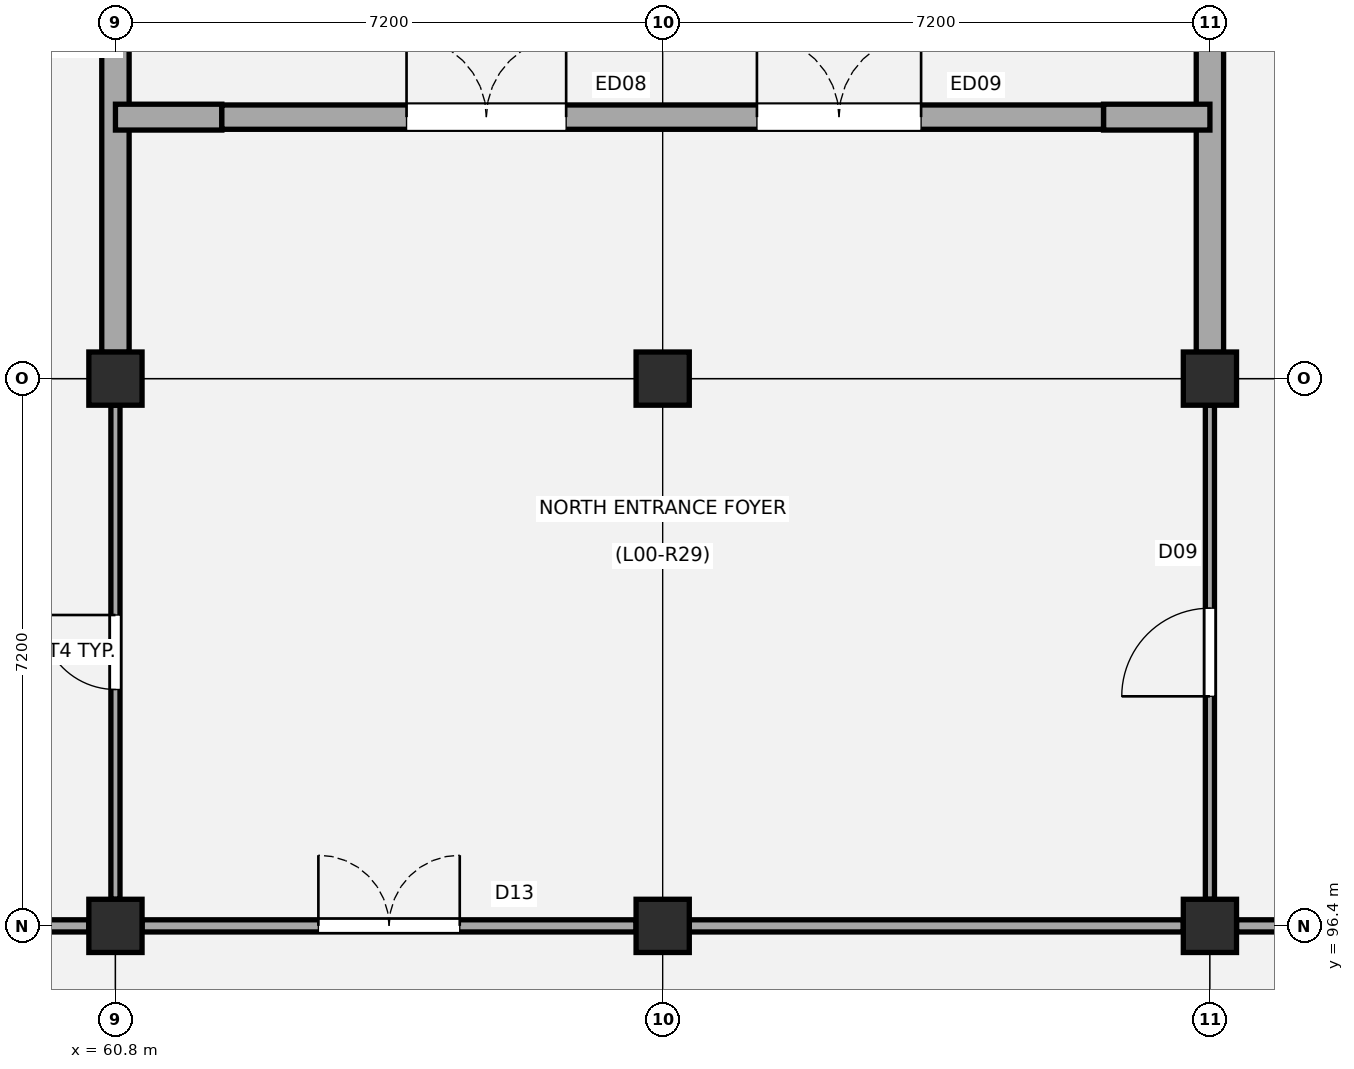
"""IFC4 building model, lengths in metres.
Left out: names, types, materials, properties, quantities, classifications, styles, units other than length and angle.
Written with IfcOpenShell. Run it as: python <this file> out.ifc"""

import sys

from ifc_helpers import new_model, si_unit, direction, frame, frame_2d, origin, origin_2d, place, context, subcontext, project, spatial, rectangle, extrude, element, fill, save


model = new_model("IFC4")
c1 = context("Model", 3, precision=1e-05, world=origin(), true_north=direction((0.0, 1.0)))
c2 = subcontext(c1, "Body", "Model", "MODEL_VIEW")
j1 = project(units=[si_unit("LENGTHUNIT", "METRE"), si_unit("PLANEANGLEUNIT", "RADIAN")], contexts=[c1])
p1 = place(None, origin())
s1 = spatial("IfcSite", under=j1, at=p1, CompositionType="ELEMENT")
p2 = place(p1, origin())
s2 = spatial("IfcBuilding", under=s1, at=p2, CompositionType="ELEMENT")
p3 = place(p2, origin())
s3 = spatial("IfcBuildingStorey", under=s2, at=p3, CompositionType="ELEMENT", Elevation=0.0)
for number, where, z_axis, x_axis in (
    (1, (60.8, 96.4, -0.35), (0.0, 0.0, 1.0), (1.0, 0.0, 0.0)),
    (2, (60.8, 103.6, -0.35), (0.0, 0.0, 1.0), (1.0, 0.0, 0.0)),
    (3, (68.0, 96.4, -0.35), (0.0, 0.0, 1.0), (1.0, 0.0, 0.0)),
    (4, (68.0, 103.6, -0.35), (0.0, 0.0, 1.0), (1.0, 0.0, 0.0)),
    (5, (75.2, 96.4, -0.35), (0.0, 0.0, 1.0), (1.0, 0.0, 0.0)),
    (6, (75.2, 103.6, -0.35), (0.0, 0.0, 1.0), (1.0, 0.0, 0.0)),
):
    element("IfcColumn", number, at=place(p3, frame(where, z_axis=z_axis, x_axis=x_axis)), inside=s3, PredefinedType="COLUMN", context=c2, shape_type="SweptSolid", body=[
        extrude(rectangle(XDim=0.7, YDim=0.7, at=origin_2d()), origin(), (0.0, 0.0, 1.0), 5.03),
    ])
for number, where, z_axis, x_axis in (
    (7, (60.8, 103.945, 0.0), (0.0, 0.0, 1.0), (0.0, 1.0, 0.0)),
    (8, (75.2, 103.945, 0.0), (0.0, 0.0, 1.0), (0.0, 1.0, 0.0)),
):
    element("IfcWall", number, at=place(p3, frame(where, z_axis=z_axis, x_axis=x_axis)), inside=s3, PredefinedType="STANDARD", context=c2, shape_type="SweptSolid", body=[
        extrude(rectangle(XDim=8.095, YDim=0.36, at=frame_2d((4.047, 0.0))), origin(), (0.0, 0.0, 1.0), 3.62),
    ])
for number, where, z_axis, x_axis in (
    (9, (60.8, 107.04, 0.0), (0.0, 0.0, 1.0), (1.0, 0.0, 0.0)),
    (10, (73.8, 107.04, 0.0), (0.0, 0.0, 1.0), (1.0, 0.0, 0.0)),
):
    element("IfcWall", number, at=place(p3, frame(where, z_axis=z_axis, x_axis=x_axis)), inside=s3, PredefinedType="STANDARD", context=c2, shape_type="SweptSolid", body=[
        extrude(rectangle(XDim=1.4, YDim=0.34, at=frame_2d((0.7, 0.0))), origin(), (0.0, 0.0, 1.0), 8.87),
    ])
p4 = place(p3, frame((62.2, 107.04, 0.0), z_axis=(0.0, 0.0, 1.0), x_axis=(1.0, 0.0, 0.0)))
e11 = element("IfcWall", 11, at=p4, inside=s3, PredefinedType="STANDARD", context=c2, shape_type="SweptSolid", body=[
    extrude(rectangle(XDim=11.6, YDim=0.32, at=frame_2d((5.8, 0.0))), origin(), (0.0, 0.0, 1.0), 2.68),
])
p5 = place(p4, frame((2.43, 0.0, 0.0)))
e12 = element("IfcOpeningElement", 12, at=p5, cuts=e11, PredefinedType="OPENING", context=c2, shape_type="SweptSolid", body=[
    extrude(rectangle(XDim=2.1, YDim=2.34, at=frame_2d((1.05, 1.17))), frame((0.0, 0.17, 0.0), z_axis=(0.0, -1.0, 0.0), x_axis=(1.0, 0.0, 0.0)), (0.0, 0.0, 1.0), 0.34),
])
p6 = place(p4, frame((7.04, 0.0, 0.0)))
e13 = element("IfcOpeningElement", 13, at=p6, cuts=e11, PredefinedType="OPENING", context=c2, shape_type="SweptSolid", body=[
    extrude(rectangle(XDim=2.16, YDim=2.36, at=frame_2d((1.08, 1.18))), frame((0.0, 0.17, 0.0), z_axis=(0.0, -1.0, 0.0), x_axis=(1.0, 0.0, 0.0)), (0.0, 0.0, 1.0), 0.34),
])
p7 = place(p3, frame((53.95, 96.4, 0.0), z_axis=(0.0, 0.0, 1.0), x_axis=(1.0, 0.0, 0.0)))
e14 = element("IfcWall", 14, at=p7, inside=s3, PredefinedType="PARTITIONING", context=c2, shape_type="SweptSolid", body=[
    extrude(rectangle(XDim=6.5, YDim=0.16, at=frame_2d((3.25, 0.0))), origin(), (0.0, 0.0, 1.0), 3.52),
])
p8 = place(p3, frame((60.8, 96.75, 0.0), z_axis=(0.0, 0.0, 1.0), x_axis=(0.0, 1.0, 0.0)))
e15 = element("IfcWall", 15, at=p8, inside=s3, PredefinedType="PARTITIONING", context=c2, shape_type="SweptSolid", body=[
    extrude(rectangle(XDim=6.5, YDim=0.12, at=frame_2d((3.25, 0.0))), origin(), (0.0, 0.0, 1.0), 3.62),
])
p9 = place(p8, frame((2.76, 0.0, 0.0)))
e16 = element("IfcOpeningElement", 16, at=p9, cuts=e15, PredefinedType="OPENING", context=c2, shape_type="SweptSolid", body=[
    extrude(rectangle(XDim=0.98, YDim=2.12, at=frame_2d((0.49, 1.06))), frame((0.0, 0.07, 0.0), z_axis=(0.0, -1.0, 0.0), x_axis=(1.0, 0.0, 0.0)), (0.0, 0.0, 1.0), 0.14),
])
p10 = place(p3, frame((61.15, 96.4, 0.0), z_axis=(0.0, 0.0, 1.0), x_axis=(1.0, 0.0, 0.0)))
e17 = element("IfcWall", 17, at=p10, inside=s3, PredefinedType="PARTITIONING", context=c2, shape_type="SweptSolid", body=[
    extrude(rectangle(XDim=6.5, YDim=0.16, at=frame_2d((3.25, 0.0))), origin(), (0.0, 0.0, 1.0), 3.62),
])
p11 = place(p10, frame((2.32, 0.0, 0.0)))
e18 = element("IfcOpeningElement", 18, at=p11, cuts=e17, PredefinedType="OPENING", context=c2, shape_type="SweptSolid", body=[
    extrude(rectangle(XDim=1.86, YDim=2.26, at=frame_2d((0.93, 1.13))), frame((0.0, 0.09, 0.0), z_axis=(0.0, -1.0, 0.0), x_axis=(1.0, 0.0, 0.0)), (0.0, 0.0, 1.0), 0.18),
])
p12 = place(p3, frame((68.35, 96.4, 0.0), z_axis=(0.0, 0.0, 1.0), x_axis=(1.0, 0.0, 0.0)))
e19 = element("IfcWall", 19, at=p12, inside=s3, PredefinedType="PARTITIONING", context=c2, shape_type="SweptSolid", body=[
    extrude(rectangle(XDim=6.5, YDim=0.16, at=frame_2d((3.25, 0.0))), origin(), (0.0, 0.0, 1.0), 3.52),
])
p13 = place(p3, frame((75.2, 96.75, 0.0), z_axis=(0.0, 0.0, 1.0), x_axis=(0.0, 1.0, 0.0)))
e20 = element("IfcWall", 20, at=p13, inside=s3, PredefinedType="PARTITIONING", context=c2, shape_type="SweptSolid", body=[
    extrude(rectangle(XDim=6.5, YDim=0.12, at=frame_2d((3.25, 0.0))), origin(), (0.0, 0.0, 1.0), 3.62),
])
p14 = place(p13, frame((2.67, 0.0, 0.0)))
e21 = element("IfcOpeningElement", 21, at=p14, cuts=e20, PredefinedType="OPENING", context=c2, shape_type="SweptSolid", body=[
    extrude(rectangle(XDim=1.16, YDim=2.18, at=frame_2d((0.58, 1.09))), frame((0.0, 0.07, 0.0), z_axis=(0.0, -1.0, 0.0), x_axis=(1.0, 0.0, 0.0)), (0.0, 0.0, 1.0), 0.14),
])
p15 = place(p3, frame((75.55, 96.4, 0.0), z_axis=(0.0, 0.0, 1.0), x_axis=(1.0, 0.0, 0.0)))
e22 = element("IfcWall", 22, at=p15, inside=s3, PredefinedType="PARTITIONING", context=c2, shape_type="SweptSolid", body=[
    extrude(rectangle(XDim=6.5, YDim=0.16, at=frame_2d((3.25, 0.0))), origin(), (0.0, 0.0, 1.0), 3.62),
])
p16 = place(p15, frame((2.76, 0.0, 0.0)))
e23 = element("IfcOpeningElement", 23, at=p16, cuts=e22, PredefinedType="OPENING", context=c2, shape_type="SweptSolid", body=[
    extrude(rectangle(XDim=0.98, YDim=2.12, at=frame_2d((0.49, 1.06))), frame((0.0, 0.09, 0.0), z_axis=(0.0, -1.0, 0.0), x_axis=(1.0, 0.0, 0.0)), (0.0, 0.0, 1.0), 0.18),
])
p17 = place(p5, origin())
e24 = element("IfcDoor", 24, at=p17, inside=s3, OperationType="DOUBLE_DOOR_SINGLE_SWING", PredefinedType="DOOR", context=c2, shape_type="SweptSolid", body=[
    extrude(rectangle(XDim=2.1, YDim=2.34, at=frame_2d((1.05, 1.17))), frame((0.0, 0.025, 0.0), z_axis=(0.0, -1.0, 0.0), x_axis=(1.0, 0.0, 0.0)), (0.0, 0.0, 1.0), 0.05),
])
fill(e12, e24)
p18 = place(p6, origin())
e25 = element("IfcDoor", 25, at=p18, inside=s3, OperationType="DOUBLE_DOOR_SINGLE_SWING", PredefinedType="DOOR", context=c2, shape_type="SweptSolid", body=[
    extrude(rectangle(XDim=2.16, YDim=2.36, at=frame_2d((1.08, 1.18))), frame((0.0, 0.025, 0.0), z_axis=(0.0, -1.0, 0.0), x_axis=(1.0, 0.0, 0.0)), (0.0, 0.0, 1.0), 0.05),
])
fill(e13, e25)
p19 = place(p11, origin())
e26 = element("IfcDoor", 26, at=p19, inside=s3, OperationType="DOUBLE_DOOR_SINGLE_SWING", PredefinedType="DOOR", context=c2, shape_type="SweptSolid", body=[
    extrude(rectangle(XDim=1.86, YDim=2.26, at=frame_2d((0.93, 1.13))), frame((0.0, 0.025, 0.0), z_axis=(0.0, -1.0, 0.0), x_axis=(1.0, 0.0, 0.0)), (0.0, 0.0, 1.0), 0.05),
])
fill(e18, e26)
p20 = place(p9, origin())
e27 = element("IfcDoor", 27, at=p20, inside=s3, OperationType="SINGLE_SWING_RIGHT", PredefinedType="DOOR", context=c2, shape_type="SweptSolid", body=[
    extrude(rectangle(XDim=0.98, YDim=2.12, at=frame_2d((0.49, 1.06))), frame((0.0, 0.025, 0.0), z_axis=(0.0, -1.0, 0.0), x_axis=(1.0, 0.0, 0.0)), (0.0, 0.0, 1.0), 0.05),
])
fill(e16, e27)
p21 = place(p14, origin())
e28 = element("IfcDoor", 28, at=p21, inside=s3, OperationType="SINGLE_SWING_LEFT", PredefinedType="DOOR", context=c2, shape_type="SweptSolid", body=[
    extrude(rectangle(XDim=1.16, YDim=2.18, at=frame_2d((0.58, 1.09))), frame((0.0, 0.025, 0.0), z_axis=(0.0, -1.0, 0.0), x_axis=(1.0, 0.0, 0.0)), (0.0, 0.0, 1.0), 0.05),
])
fill(e21, e28)
save(model, sys.argv[1])
